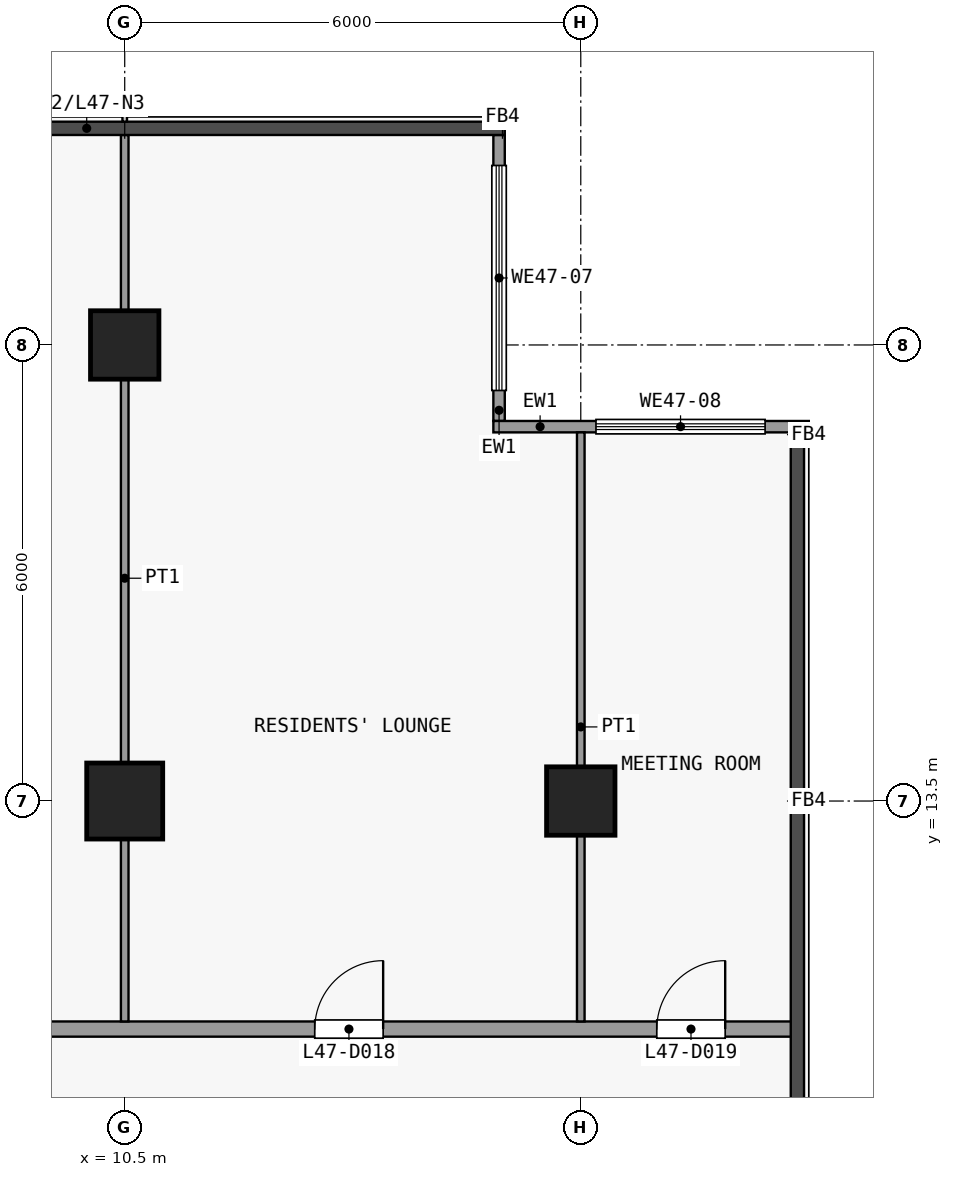
"""IFC4 building model, lengths in metres.
Left out: names, types, materials, properties, quantities, classifications, styles, units other than length and angle.
Written with IfcOpenShell. Run it as: python <this file> out.ifc"""

import sys

from ifc_helpers import new_model, si_unit, direction, frame, frame_2d, origin, origin_2d, place, context, subcontext, project, spatial, rectangle, extrude, element, fill, save


model = new_model("IFC4")
c1 = context("Model", 3, precision=1e-05, world=origin(), true_north=direction((0.0, 1.0)))
c2 = subcontext(c1, "Body", "Model", "MODEL_VIEW")
j1 = project(units=[si_unit("LENGTHUNIT", "METRE"), si_unit("PLANEANGLEUNIT", "RADIAN")], contexts=[c1])
p1 = place(None, origin())
s1 = spatial("IfcSite", under=j1, at=p1, CompositionType="ELEMENT")
p2 = place(p1, origin())
s2 = spatial("IfcBuilding", under=s1, at=p2, CompositionType="ELEMENT")
p3 = place(p2, frame((0.0, 0.0, 188.9)))
s3 = spatial("IfcBuildingStorey", under=s2, at=p3, CompositionType="ELEMENT", Elevation=188.9)
p4 = place(p3, frame((10.5, 13.5, 0.0), z_axis=(0.0, 0.0, 1.0), x_axis=(1.0, 0.0, 0.0)))
e1 = element("IfcColumn", 1, at=p4, inside=s3, PredefinedType="COLUMN", context=c2, shape_type="SweptSolid", body=[
    extrude(rectangle(XDim=1.0, YDim=1.0, at=origin_2d()), origin(), (0.0, 0.0, 1.0), 3.6),
])
for number, where, z_axis, x_axis in (
    (2, (10.5, 19.5, 0.0), (0.0, 0.0, 1.0), (1.0, 0.0, 0.0)),
    (3, (16.5, 13.5, 0.0), (0.0, 0.0, 1.0), (1.0, 0.0, 0.0)),
):
    element("IfcColumn", number, at=place(p3, frame(where, z_axis=z_axis, x_axis=x_axis)), inside=s3, PredefinedType="COLUMN", context=c2, shape_type="SweptSolid", body=[
        extrude(rectangle(XDim=0.9, YDim=0.9, at=origin_2d()), origin(), (0.0, 0.0, 1.0), 3.6),
    ])
p5 = place(p3, frame((15.425, 22.262, 0.0), z_axis=(0.0, 0.0, 1.0), x_axis=(0.0, -1.0, 0.0)))
e4 = element("IfcWall", 4, at=p5, inside=s3, PredefinedType="SOLIDWALL", context=c2, shape_type="SweptSolid", body=[
    extrude(rectangle(XDim=3.762, YDim=0.15, at=frame_2d((1.881, 0.0))), origin(), (0.0, 0.0, 1.0), 3.3),
])
p6 = place(p5, frame((0.401, 0.0, 0.9)))
e5 = element("IfcOpeningElement", 5, at=p6, cuts=e4, PredefinedType="OPENING", context=c2, shape_type="SweptSolid", body=[
    extrude(rectangle(XDim=2.96, YDim=2.4, at=frame_2d((1.48, 1.2))), frame((0.0, 0.085, 0.0), z_axis=(0.0, -1.0, 0.0), x_axis=(1.0, 0.0, 0.0)), (0.0, 0.0, 1.0), 0.17),
])
p7 = place(p3, frame((15.35, 18.425, 0.0), z_axis=(0.0, 0.0, 1.0), x_axis=(1.0, 0.0, 0.0)))
e6 = element("IfcWall", 6, at=p7, inside=s3, PredefinedType="SOLIDWALL", context=c2, shape_type="SweptSolid", body=[
    extrude(rectangle(XDim=4.15, YDim=0.15, at=frame_2d((2.075, 0.0))), origin(), (0.0, 0.0, 1.0), 3.3),
])
p8 = place(p7, frame((1.35, 0.0, 0.9)))
e7 = element("IfcOpeningElement", 7, at=p8, cuts=e6, PredefinedType="OPENING", context=c2, shape_type="SweptSolid", body=[
    extrude(rectangle(XDim=2.225, YDim=2.4, at=frame_2d((1.113, 1.2))), frame((0.0, 0.085, 0.0), z_axis=(0.0, -1.0, 0.0), x_axis=(1.0, 0.0, 0.0)), (0.0, 0.0, 1.0), 0.17),
])
p9 = place(p3, frame((-19.35, 10.5, 0.0), z_axis=(0.0, 0.0, 1.0), x_axis=(1.0, 0.0, 0.0)))
e8 = element("IfcWall", 8, at=p9, inside=s3, PredefinedType="PARTITIONING", context=c2, shape_type="SweptSolid", body=[
    extrude(rectangle(XDim=38.7, YDim=0.2, at=frame_2d((19.35, 0.0))), origin(), (0.0, 0.0, 1.0), 3.3),
])
p10 = place(p9, frame((10.55, 0.0, 0.0)))
e9 = element("IfcOpeningElement", 9, at=p10, cuts=e8, PredefinedType="OPENING", context=c2, shape_type="SweptSolid", body=[
    extrude(rectangle(XDim=1.0, YDim=2.1, at=frame_2d((0.5, 1.05))), frame((0.0, 0.11, 0.0), z_axis=(0.0, -1.0, 0.0), x_axis=(1.0, 0.0, 0.0)), (0.0, 0.0, 1.0), 0.22),
])
p11 = place(p9, frame((18.85, 0.0, 0.0)))
e10 = element("IfcOpeningElement", 10, at=p11, cuts=e8, PredefinedType="OPENING", context=c2, shape_type="SweptSolid", body=[
    extrude(rectangle(XDim=0.9, YDim=2.1, at=frame_2d((0.45, 1.05))), frame((0.0, 0.11, 0.0), z_axis=(0.0, -1.0, 0.0), x_axis=(1.0, 0.0, 0.0)), (0.0, 0.0, 1.0), 0.22),
])
p12 = place(p9, frame((26.35, 0.0, 0.0)))
e11 = element("IfcOpeningElement", 11, at=p12, cuts=e8, PredefinedType="OPENING", context=c2, shape_type="SweptSolid", body=[
    extrude(rectangle(XDim=0.9, YDim=2.1, at=frame_2d((0.45, 1.05))), frame((0.0, 0.11, 0.0), z_axis=(0.0, -1.0, 0.0), x_axis=(1.0, 0.0, 0.0)), (0.0, 0.0, 1.0), 0.22),
])
p13 = place(p9, frame((32.35, 0.0, 0.0)))
e12 = element("IfcOpeningElement", 12, at=p13, cuts=e8, PredefinedType="OPENING", context=c2, shape_type="SweptSolid", body=[
    extrude(rectangle(XDim=0.9, YDim=2.1, at=frame_2d((0.45, 1.05))), frame((0.0, 0.11, 0.0), z_axis=(0.0, -1.0, 0.0), x_axis=(1.0, 0.0, 0.0)), (0.0, 0.0, 1.0), 0.22),
])
p14 = place(p9, frame((36.85, 0.0, 0.0)))
e13 = element("IfcOpeningElement", 13, at=p14, cuts=e8, PredefinedType="OPENING", context=c2, shape_type="SweptSolid", body=[
    extrude(rectangle(XDim=0.9, YDim=2.1, at=frame_2d((0.45, 1.05))), frame((0.0, 0.11, 0.0), z_axis=(0.0, -1.0, 0.0), x_axis=(1.0, 0.0, 0.0)), (0.0, 0.0, 1.0), 0.22),
])
p15 = place(p3, frame((10.5, 10.6, 0.0), z_axis=(0.0, 0.0, 1.0), x_axis=(0.0, 1.0, 0.0)))
e14 = element("IfcWall", 14, at=p15, inside=s3, PredefinedType="PARTITIONING", context=c2, shape_type="SweptSolid", body=[
    extrude(rectangle(XDim=11.662, YDim=0.1, at=frame_2d((5.831, 0.0))), origin(), (0.0, 0.0, 1.0), 3.3),
])
p16 = place(p3, frame((16.5, 10.6, 0.0), z_axis=(0.0, 0.0, 1.0), x_axis=(0.0, 1.0, 0.0)))
e15 = element("IfcWall", 15, at=p16, inside=s3, PredefinedType="PARTITIONING", context=c2, shape_type="SweptSolid", body=[
    extrude(rectangle(XDim=7.75, YDim=0.1, at=frame_2d((3.875, 0.0))), origin(), (0.0, 0.0, 1.0), 3.3),
])
p17 = place(p6, origin())
e16 = element("IfcWindow", 16, at=p17, inside=s3, PartitioningType="SINGLE_PANEL", PredefinedType="WINDOW", context=c2, shape_type="SweptSolid", body=[
    extrude(rectangle(XDim=2.96, YDim=2.4, at=frame_2d((1.48, 1.2))), frame((0.0, 0.03, 0.0), z_axis=(0.0, -1.0, 0.0), x_axis=(1.0, 0.0, 0.0)), (0.0, 0.0, 1.0), 0.06),
])
fill(e5, e16)
p18 = place(p8, origin())
e17 = element("IfcWindow", 17, at=p18, inside=s3, PartitioningType="SINGLE_PANEL", PredefinedType="WINDOW", context=c2, shape_type="SweptSolid", body=[
    extrude(rectangle(XDim=2.225, YDim=2.4, at=frame_2d((1.113, 1.2))), frame((0.0, 0.03, 0.0), z_axis=(0.0, -1.0, 0.0), x_axis=(1.0, 0.0, 0.0)), (0.0, 0.0, 1.0), 0.06),
])
fill(e7, e17)
p19 = place(p13, origin())
e18 = element("IfcDoor", 18, at=p19, inside=s3, OperationType="SINGLE_SWING_LEFT", PredefinedType="DOOR", context=c2, shape_type="SweptSolid", body=[
    extrude(rectangle(XDim=0.9, YDim=2.1, at=frame_2d((0.45, 1.05))), frame((0.0, 0.025, 0.0), z_axis=(0.0, -1.0, 0.0), x_axis=(1.0, 0.0, 0.0)), (0.0, 0.0, 1.0), 0.05),
])
fill(e12, e18)
p20 = place(p14, origin())
e19 = element("IfcDoor", 19, at=p20, inside=s3, OperationType="SINGLE_SWING_LEFT", PredefinedType="DOOR", context=c2, shape_type="SweptSolid", body=[
    extrude(rectangle(XDim=0.9, YDim=2.1, at=frame_2d((0.45, 1.05))), frame((0.0, 0.025, 0.0), z_axis=(0.0, -1.0, 0.0), x_axis=(1.0, 0.0, 0.0)), (0.0, 0.0, 1.0), 0.05),
])
fill(e13, e19)
save(model, sys.argv[1])
